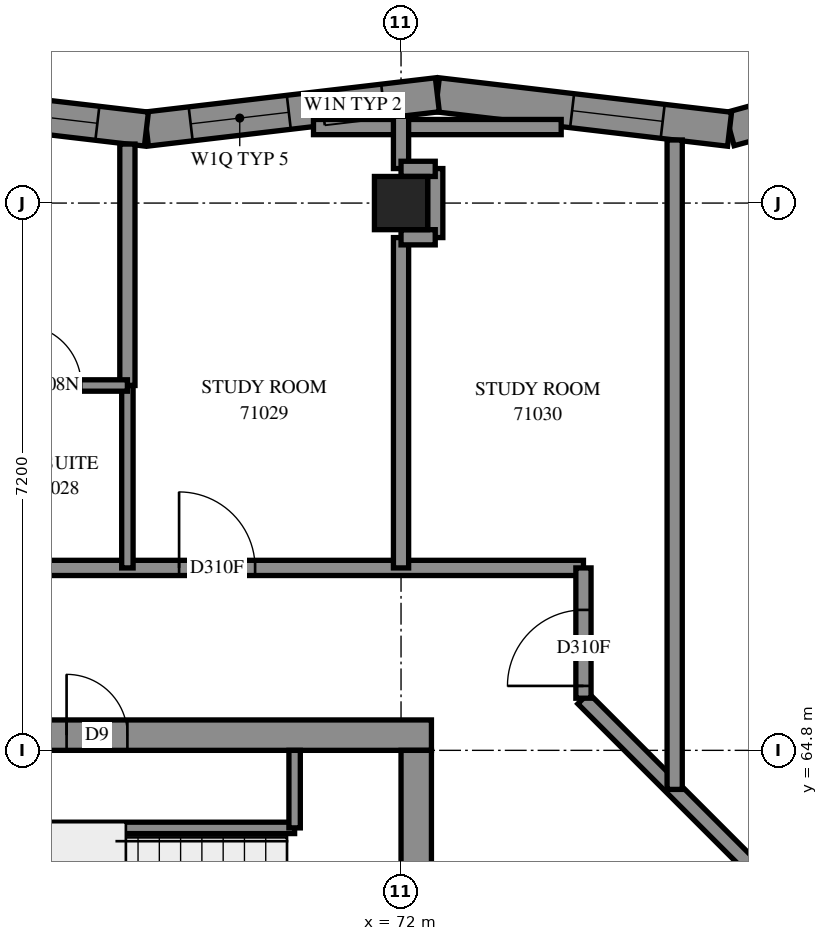
"""IFC4 building model, lengths in metres.
Left out: names, types, materials, properties, quantities, classifications, styles, units other than length and angle.
Written with IfcOpenShell. Run it as: python <this file> out.ifc"""

import sys

from ifc_helpers import new_model, si_unit, direction, frame, frame_2d, origin, origin_2d, place, context, subcontext, project, spatial, polyline, rectangle, outline, extrude, element, fill, save


model = new_model("IFC4")
c1 = context("Model", 3, precision=1e-05, world=origin(), true_north=direction((0.0, 1.0)))
c2 = subcontext(c1, "Body", "Model", "MODEL_VIEW")
j1 = project(units=[si_unit("LENGTHUNIT", "METRE"), si_unit("PLANEANGLEUNIT", "RADIAN")], contexts=[c1])
p1 = place(None, origin())
s1 = spatial("IfcSite", under=j1, at=p1, CompositionType="ELEMENT")
p2 = place(p1, origin())
s2 = spatial("IfcBuilding", under=s1, at=p2, CompositionType="ELEMENT")
p3 = place(p2, frame((0.0, 0.0, 260.8)))
s3 = spatial("IfcBuildingStorey", under=s2, at=p3, CompositionType="ELEMENT", Elevation=260.8)
p4 = place(p3, frame((72.0, 72.0, 0.0), z_axis=(0.0, 0.0, 1.0), x_axis=(1.0, 0.0, 0.0)))
e1 = element("IfcColumn", 1, at=p4, inside=s3, PredefinedType="COLUMN", context=c2, shape_type="SweptSolid", body=[
    extrude(rectangle(XDim=0.7, YDim=0.7, at=origin_2d()), origin(), (0.0, 0.0, 1.0), 3.1),
])
p5 = place(p3, frame((57.2, 65.0, -0.3), z_axis=(0.0, 0.0, 1.0), x_axis=(1.0, 0.0, 0.0)))
e2 = element("IfcWall", 2, at=p5, inside=s3, PredefinedType="SHEAR", context=c2, shape_type="SweptSolid", body=[
    extrude(rectangle(XDim=15.2, YDim=0.4, at=frame_2d((7.6, 0.0))), origin(), (0.0, 0.0, 1.0), 2.7),
])
p6 = place(p5, frame((10.4, 0.0, 0.3)))
e3 = element("IfcOpeningElement", 3, at=p6, cuts=e2, PredefinedType="OPENING", context=c2, shape_type="SweptSolid", body=[
    extrude(rectangle(XDim=0.8, YDim=2.1, at=frame_2d((0.4, 1.05))), frame((0.0, 0.21, 0.0), z_axis=(0.0, -1.0, 0.0), x_axis=(1.0, 0.0, 0.0)), (0.0, 0.0, 1.0), 0.42),
])
p7 = place(p3, frame((72.2, 50.4, -0.3), z_axis=(0.0, 0.0, 1.0), x_axis=(0.0, 1.0, 0.0)))
e4 = element("IfcWall", 4, at=p7, inside=s3, PredefinedType="SHEAR", context=c2, shape_type="SweptSolid", body=[
    extrude(rectangle(XDim=14.4, YDim=0.4, at=frame_2d((7.2, 0.0))), origin(), (0.0, 0.0, 1.0), 2.7),
])
p8 = place(p7, frame((4.55, 0.0, 0.3)))
e5 = element("IfcOpeningElement", 5, at=p8, cuts=e4, PredefinedType="OPENING", context=c2, shape_type="SweptSolid", body=[
    extrude(rectangle(XDim=1.1, YDim=2.1, at=frame_2d((0.55, 1.05))), frame((0.0, 0.21, 0.0), z_axis=(0.0, -1.0, 0.0), x_axis=(1.0, 0.0, 0.0)), (0.0, 0.0, 1.0), 0.42),
])
p9 = place(p7, frame((11.35, 0.0, 0.3)))
e6 = element("IfcOpeningElement", 6, at=p9, cuts=e4, PredefinedType="OPENING", context=c2, shape_type="SweptSolid", body=[
    extrude(rectangle(XDim=1.1, YDim=2.1, at=frame_2d((0.55, 1.05))), frame((0.0, 0.21, 0.0), z_axis=(0.0, -1.0, 0.0), x_axis=(1.0, 0.0, 0.0)), (0.0, 0.0, 1.0), 0.42),
])
p10 = place(p3, frame((80.017, 73.986, 0.0), z_axis=(0.0, 0.0, 1.0), x_axis=(-0.9643045882, -0.2647955081, 0.0)))
e7 = element("IfcWall", 7, at=p10, inside=s3, PredefinedType="SOLIDWALL", context=c2, shape_type="SweptSolid", body=[
    extrude(outline(polyline([(-0.182, -0.225), (3.787, -0.225), (3.875, 0.225), (0.182, 0.225), (-0.182, -0.225)])), origin(), (0.0, 0.0, 1.0), 3.1),
])
p11 = place(p10, frame((1.239, 0.0, 0.45)))
e8 = element("IfcOpeningElement", 8, at=p11, cuts=e7, PredefinedType="OPENING", context=c2, shape_type="SweptSolid", body=[
    extrude(rectangle(XDim=1.2, YDim=2.55, at=frame_2d((0.6, 1.275))), frame((0.0, 0.235, 0.0), z_axis=(0.0, -1.0, 0.0), x_axis=(1.0, 0.0, 0.0)), (0.0, 0.0, 1.0), 0.47),
])
p12 = place(p3, frame((76.322, 72.971, 0.0), z_axis=(0.0, 0.0, 1.0), x_axis=(-0.9931297821, 0.117018101, 0.0)))
e9 = element("IfcWall", 9, at=p12, inside=s3, PredefinedType="SOLIDWALL", context=c2, shape_type="SweptSolid", body=[
    extrude(outline(polyline([(0.044, -0.225), (3.898, -0.225), (3.845, 0.225), (-0.044, 0.225), (0.044, -0.225)])), origin(), (0.0, 0.0, 1.0), 3.1),
])
p13 = place(p12, frame((0.886, 0.0, 0.45)))
e10 = element("IfcOpeningElement", 10, at=p13, cuts=e9, PredefinedType="OPENING", context=c2, shape_type="SweptSolid", body=[
    extrude(rectangle(XDim=1.2, YDim=2.55, at=frame_2d((0.6, 1.275))), frame((0.0, 0.235, 0.0), z_axis=(0.0, -1.0, 0.0), x_axis=(1.0, 0.0, 0.0)), (0.0, 0.0, 1.0), 0.47),
])
p14 = place(p3, frame((72.478, 73.424, 0.0), z_axis=(0.0, 0.0, 1.0), x_axis=(-0.9931289789, -0.1170249176, 0.0)))
e11 = element("IfcWall", 11, at=p14, inside=s3, PredefinedType="SOLIDWALL", context=c2, shape_type="SweptSolid", body=[
    extrude(outline(polyline([(-0.026, -0.225), (3.827, -0.225), (3.88, 0.225), (0.026, 0.225), (-0.026, -0.225)])), origin(), (0.0, 0.0, 1.0), 3.1),
])
p15 = place(p14, frame((0.718, 0.0, 0.45)))
e12 = element("IfcOpeningElement", 12, at=p15, cuts=e11, PredefinedType="OPENING", context=c2, shape_type="SweptSolid", body=[
    extrude(rectangle(XDim=0.8, YDim=2.5, at=frame_2d((0.4, 1.25))), frame((0.0, 0.235, 0.0), z_axis=(0.0, -1.0, 0.0), x_axis=(1.0, 0.0, 0.0)), (0.0, 0.0, 1.0), 0.47),
])
p16 = place(p14, frame((1.968, 0.0, 0.45)))
e13 = element("IfcOpeningElement", 13, at=p16, cuts=e11, PredefinedType="OPENING", context=c2, shape_type="SweptSolid", body=[
    extrude(rectangle(XDim=1.3, YDim=2.5, at=frame_2d((0.65, 1.25))), frame((0.0, 0.235, 0.0), z_axis=(0.0, -1.0, 0.0), x_axis=(1.0, 0.0, 0.0)), (0.0, 0.0, 1.0), 0.47),
])
p17 = place(p3, frame((68.65, 72.973, 0.0), z_axis=(0.0, 0.0, 1.0), x_axis=(-0.9931289789, 0.1170249176, 0.0)))
e14 = element("IfcWall", 14, at=p17, inside=s3, PredefinedType="SOLIDWALL", context=c2, shape_type="SweptSolid", body=[
    extrude(outline(polyline([(0.026, -0.225), (3.88, -0.225), (3.827, 0.225), (-0.026, 0.225), (0.026, -0.225)])), origin(), (0.0, 0.0, 1.0), 3.1),
])
p18 = place(p17, frame((0.65, 0.0, 0.45)))
e15 = element("IfcOpeningElement", 15, at=p18, cuts=e14, PredefinedType="OPENING", context=c2, shape_type="SweptSolid", body=[
    extrude(rectangle(XDim=1.3, YDim=2.5, at=frame_2d((0.65, 1.25))), frame((0.0, 0.235, 0.0), z_axis=(0.0, -1.0, 0.0), x_axis=(1.0, 0.0, 0.0)), (0.0, 0.0, 1.0), 0.47),
])
p19 = place(p17, frame((2.3, 0.0, 0.45)))
e16 = element("IfcOpeningElement", 16, at=p19, cuts=e14, PredefinedType="OPENING", context=c2, shape_type="SweptSolid", body=[
    extrude(rectangle(XDim=1.0, YDim=2.5, at=frame_2d((0.5, 1.25))), frame((0.0, 0.235, 0.0), z_axis=(0.0, -1.0, 0.0), x_axis=(1.0, 0.0, 0.0)), (0.0, 0.0, 1.0), 0.47),
])
p20 = place(p3, frame((64.95, 63.78, 0.0), z_axis=(0.0, 0.0, 1.0), x_axis=(1.0, 0.0, 0.0)))
e17 = element("IfcWall", 17, at=p20, inside=s3, PredefinedType="PARTITIONING", context=c2, shape_type="SweptSolid", body=[
    extrude(rectangle(XDim=5.65, YDim=0.15, at=frame_2d((2.825, 0.0))), origin(), (0.0, 0.0, 1.0), 3.1),
])
p21 = place(p3, frame((70.6, 63.78, 0.0), z_axis=(0.0, 0.0, 1.0), x_axis=(0.0, 1.0, 0.0)))
e18 = element("IfcWall", 18, at=p21, inside=s3, PredefinedType="PARTITIONING", context=c2, shape_type="SweptSolid", body=[
    extrude(rectangle(XDim=1.02, YDim=0.15, at=frame_2d((0.51, 0.0))), origin(), (0.0, 0.0, 1.0), 3.1),
])
p22 = place(p3, frame((55.2, 67.2, 0.0), z_axis=(0.0, 0.0, 1.0), x_axis=(1.0, 0.0, 0.0)))
e19 = element("IfcWall", 19, at=p22, inside=s3, PredefinedType="PARTITIONING", context=c2, shape_type="SweptSolid", body=[
    extrude(rectangle(XDim=19.2, YDim=0.2, at=frame_2d((9.6, 0.0))), origin(), (0.0, 0.0, 1.0), 3.1),
])
p23 = place(p22, frame((4.475, 0.0, 0.0)))
e20 = element("IfcOpeningElement", 20, at=p23, cuts=e19, PredefinedType="OPENING", context=c2, shape_type="SweptSolid", body=[
    extrude(rectangle(XDim=1.0, YDim=2.1, at=frame_2d((0.5, 1.05))), frame((0.0, 0.11, 0.0), z_axis=(0.0, -1.0, 0.0), x_axis=(1.0, 0.0, 0.0)), (0.0, 0.0, 1.0), 0.22),
])
p24 = place(p22, frame((8.301, 0.0, 0.0)))
e21 = element("IfcOpeningElement", 21, at=p24, cuts=e19, PredefinedType="OPENING", context=c2, shape_type="SweptSolid", body=[
    extrude(rectangle(XDim=0.9, YDim=2.1, at=frame_2d((0.45, 1.05))), frame((0.0, 0.11, 0.0), z_axis=(0.0, -1.0, 0.0), x_axis=(1.0, 0.0, 0.0)), (0.0, 0.0, 1.0), 0.22),
])
p25 = place(p22, frame((13.88, 0.0, 0.0)))
e22 = element("IfcOpeningElement", 22, at=p25, cuts=e19, PredefinedType="OPENING", context=c2, shape_type="SweptSolid", body=[
    extrude(rectangle(XDim=1.0, YDim=2.1, at=frame_2d((0.5, 1.05))), frame((0.0, 0.11, 0.0), z_axis=(0.0, -1.0, 0.0), x_axis=(1.0, 0.0, 0.0)), (0.0, 0.0, 1.0), 0.22),
])
p26 = place(p3, frame((74.397, 65.483, 0.0), z_axis=(0.0, 0.0, 1.0), x_axis=(0.7071067812, -0.7071067812, 0.0)))
e23 = element("IfcWall", 23, at=p26, inside=s3, PredefinedType="PARTITIONING", context=c2, shape_type="SweptSolid", body=[
    extrude(rectangle(XDim=10.788, YDim=0.2, at=frame_2d((5.394, 0.0))), origin(), (0.0, 0.0, 1.0), 3.1),
])
p27 = place(p26, frame((5.083, 0.0, 0.0)))
e24 = element("IfcOpeningElement", 24, at=p27, cuts=e23, PredefinedType="OPENING", context=c2, shape_type="SweptSolid", body=[
    extrude(rectangle(XDim=1.0, YDim=2.1, at=frame_2d((0.5, 1.05))), frame((0.0, 0.11, 0.0), z_axis=(0.0, -1.0, 0.0), x_axis=(1.0, 0.0, 0.0)), (0.0, 0.0, 1.0), 0.22),
])
p28 = place(p26, frame((7.858, 0.0, 0.0)))
e25 = element("IfcOpeningElement", 25, at=p28, cuts=e23, PredefinedType="OPENING", context=c2, shape_type="SweptSolid", body=[
    extrude(rectangle(XDim=1.0, YDim=2.1, at=frame_2d((0.5, 1.05))), frame((0.0, 0.11, 0.0), z_axis=(0.0, -1.0, 0.0), x_axis=(1.0, 0.0, 0.0)), (0.0, 0.0, 1.0), 0.22),
])
p29 = place(p3, frame((75.6, 64.286, 0.0), z_axis=(0.0, 0.0, 1.0), x_axis=(0.0, 1.0, 0.0)))
e26 = element("IfcWall", 26, at=p29, inside=s3, PredefinedType="PARTITIONING", context=c2, shape_type="SweptSolid", body=[
    extrude(rectangle(XDim=8.544, YDim=0.2, at=frame_2d((4.272, 0.0))), origin(), (0.0, 0.0, 1.0), 3.1),
])
p30 = place(p3, frame((72.0, 67.2, 0.0), z_axis=(0.0, 0.0, 1.0), x_axis=(0.0, 1.0, 0.0)))
e27 = element("IfcWall", 27, at=p30, inside=s3, PredefinedType="PARTITIONING", context=c2, shape_type="SweptSolid", body=[
    extrude(rectangle(XDim=4.346, YDim=0.2, at=frame_2d((2.173, 0.0))), origin(), (0.0, 0.0, 1.0), 3.1),
])
p31 = place(p3, frame((70.848, 73.0, 0.0), z_axis=(0.0, 0.0, 1.0), x_axis=(1.0, 0.0, 0.0)))
e28 = element("IfcWall", 28, at=p31, inside=s3, PredefinedType="PARTITIONING", context=c2, shape_type="SweptSolid", body=[
    extrude(rectangle(XDim=3.259, YDim=0.2, at=frame_2d((1.629, 0.0))), origin(), (0.0, 0.0, 1.0), 3.1),
])
p32 = place(p3, frame((68.4, 69.6, 0.0), z_axis=(0.0, 0.0, 1.0), x_axis=(0.0, 1.0, 0.0)))
e29 = element("IfcWall", 29, at=p32, inside=s3, PredefinedType="PARTITIONING", context=c2, shape_type="SweptSolid", body=[
    extrude(rectangle(XDim=3.176, YDim=0.2, at=frame_2d((1.588, 0.0))), origin(), (0.0, 0.0, 1.0), 3.1),
])
p33 = place(p3, frame((68.4, 67.2, 0.0), z_axis=(0.0, 0.0, 1.0), x_axis=(0.0, 1.0, 0.0)))
e30 = element("IfcWall", 30, at=p33, inside=s3, PredefinedType="PARTITIONING", context=c2, shape_type="SweptSolid", body=[
    extrude(rectangle(XDim=2.4, YDim=0.15, at=frame_2d((1.2, 0.0))), origin(), (0.0, 0.0, 1.0), 3.1),
])
p34 = place(p3, frame((66.5, 69.6, 0.0), z_axis=(0.0, 0.0, 1.0), x_axis=(1.0, 0.0, 0.0)))
e31 = element("IfcWall", 31, at=p34, inside=s3, PredefinedType="PARTITIONING", context=c2, shape_type="SweptSolid", body=[
    extrude(rectangle(XDim=1.9, YDim=0.15, at=frame_2d((0.95, 0.0))), origin(), (0.0, 0.0, 1.0), 3.1),
])
p35 = place(p34, frame((0.493, 0.0, 0.0)))
e32 = element("IfcOpeningElement", 32, at=p35, cuts=e31, PredefinedType="OPENING", context=c2, shape_type="SweptSolid", body=[
    extrude(rectangle(XDim=0.8, YDim=2.1, at=frame_2d((0.4, 1.05))), frame((0.0, 0.085, 0.0), z_axis=(0.0, -1.0, 0.0), x_axis=(1.0, 0.0, 0.0)), (0.0, 0.0, 1.0), 0.17),
])
p36 = place(p3, frame((74.4, 65.486, 0.0), z_axis=(0.0, 0.0, 1.0), x_axis=(0.0, 1.0, 0.0)))
e33 = element("IfcWall", 33, at=p36, inside=s3, PredefinedType="PARTITIONING", context=c2, shape_type="SweptSolid", body=[
    extrude(rectangle(XDim=1.714, YDim=0.2, at=frame_2d((0.857, 0.0))), origin(), (0.0, 0.0, 1.0), 3.1),
])
p37 = place(p36, frame((0.162, 0.0, 0.0)))
e34 = element("IfcOpeningElement", 34, at=p37, cuts=e33, PredefinedType="OPENING", context=c2, shape_type="SweptSolid", body=[
    extrude(rectangle(XDim=1.0, YDim=2.1, at=frame_2d((0.5, 1.05))), frame((0.0, 0.11, 0.0), z_axis=(0.0, -1.0, 0.0), x_axis=(1.0, 0.0, 0.0)), (0.0, 0.0, 1.0), 0.22),
])
p38 = place(p3, frame((72.45, 71.546, 0.0), z_axis=(0.0, 0.0, 1.0), x_axis=(0.0, 1.0, 0.0)))
e35 = element("IfcWall", 35, at=p38, inside=s3, PredefinedType="PARTITIONING", context=c2, shape_type="SweptSolid", body=[
    extrude(rectangle(XDim=0.908, YDim=0.2, at=frame_2d((0.454, 0.0))), origin(), (0.0, 0.0, 1.0), 3.1),
])
p39 = place(p3, frame((72.0, 72.454, 0.0), z_axis=(0.0, 0.0, 1.0), x_axis=(0.0, 1.0, 0.0)))
e36 = element("IfcWall", 36, at=p39, inside=s3, PredefinedType="PARTITIONING", context=c2, shape_type="SweptSolid", body=[
    extrude(rectangle(XDim=0.688, YDim=0.2, at=frame_2d((0.344, 0.0))), origin(), (0.0, 0.0, 1.0), 3.1),
])
for number, where, z_axis, x_axis in (
    (37, (72.0, 72.45, 0.0), (0.0, 0.0, 1.0), (1.0, 0.0, 0.0)),
    (38, (72.0, 71.55, 0.0), (0.0, 0.0, 1.0), (1.0, 0.0, 0.0)),
):
    element("IfcWall", number, at=place(p3, frame(where, z_axis=z_axis, x_axis=x_axis)), inside=s3, PredefinedType="PARTITIONING", context=c2, shape_type="SweptSolid", body=[
        extrude(rectangle(XDim=0.45, YDim=0.2, at=frame_2d((0.225, 0.0))), origin(), (0.0, 0.0, 1.0), 3.1),
    ])
p40 = place(p13, origin())
e39 = element("IfcWindow", 39, at=p40, inside=s3, PartitioningType="SINGLE_PANEL", PredefinedType="WINDOW", context=c2, shape_type="SweptSolid", body=[
    extrude(rectangle(XDim=1.2, YDim=2.55, at=frame_2d((0.6, 1.275))), frame((0.0, 0.205, 0.0), z_axis=(0.0, -1.0, 0.0), x_axis=(1.0, 0.0, 0.0)), (0.0, 0.0, 1.0), 0.06),
])
fill(e10, e39)
p41 = place(p6, origin())
e40 = element("IfcDoor", 40, at=p41, inside=s3, OperationType="SINGLE_SWING_RIGHT", PredefinedType="DOOR", context=c2, shape_type="SweptSolid", body=[
    extrude(rectangle(XDim=0.8, YDim=2.1, at=frame_2d((0.4, 1.05))), frame((0.0, 0.025, 0.0), z_axis=(0.0, -1.0, 0.0), x_axis=(1.0, 0.0, 0.0)), (0.0, 0.0, 1.0), 0.05),
])
fill(e3, e40)
p42 = place(p35, origin())
e41 = element("IfcDoor", 41, at=p42, inside=s3, OperationType="SINGLE_SWING_RIGHT", PredefinedType="DOOR", context=c2, shape_type="SweptSolid", body=[
    extrude(rectangle(XDim=0.8, YDim=2.1, at=frame_2d((0.4, 1.05))), frame((0.0, 0.025, 0.0), z_axis=(0.0, -1.0, 0.0), x_axis=(1.0, 0.0, 0.0)), (0.0, 0.0, 1.0), 0.05),
])
fill(e32, e41)
p43 = place(p25, origin())
e42 = element("IfcDoor", 42, at=p43, inside=s3, OperationType="SINGLE_SWING_LEFT", PredefinedType="DOOR", context=c2, shape_type="SweptSolid", body=[
    extrude(rectangle(XDim=1.0, YDim=2.1, at=frame_2d((0.5, 1.05))), frame((0.0, 0.025, 0.0), z_axis=(0.0, -1.0, 0.0), x_axis=(1.0, 0.0, 0.0)), (0.0, 0.0, 1.0), 0.05),
])
fill(e22, e42)
p44 = place(p37, origin())
e43 = element("IfcDoor", 43, at=p44, inside=s3, OperationType="SINGLE_SWING_RIGHT", PredefinedType="DOOR", context=c2, shape_type="SweptSolid", body=[
    extrude(rectangle(XDim=1.0, YDim=2.1, at=frame_2d((0.5, 1.05))), frame((0.0, 0.025, 0.0), z_axis=(0.0, -1.0, 0.0), x_axis=(1.0, 0.0, 0.0)), (0.0, 0.0, 1.0), 0.05),
])
fill(e34, e43)
p45 = place(p15, origin())
e44 = element("IfcWindow", 44, at=p45, inside=s3, PartitioningType="SINGLE_PANEL", PredefinedType="WINDOW", context=c2, shape_type="SweptSolid", body=[
    extrude(rectangle(XDim=0.8, YDim=2.5, at=frame_2d((0.4, 1.25))), frame((0.0, 0.115, 0.0), z_axis=(0.0, -1.0, 0.0), x_axis=(1.0, 0.0, 0.0)), (0.0, 0.0, 1.0), 0.06),
])
fill(e12, e44)
p46 = place(p16, origin())
e45 = element("IfcWindow", 45, at=p46, inside=s3, PartitioningType="SINGLE_PANEL", PredefinedType="WINDOW", context=c2, shape_type="SweptSolid", body=[
    extrude(rectangle(XDim=1.3, YDim=2.5, at=frame_2d((0.65, 1.25))), frame((0.0, 0.205, 0.0), z_axis=(0.0, -1.0, 0.0), x_axis=(1.0, 0.0, 0.0)), (0.0, 0.0, 1.0), 0.06),
])
fill(e13, e45)
p47 = place(p18, origin())
e46 = element("IfcWindow", 46, at=p47, inside=s3, PartitioningType="SINGLE_PANEL", PredefinedType="WINDOW", context=c2, shape_type="SweptSolid", body=[
    extrude(rectangle(XDim=1.3, YDim=2.5, at=frame_2d((0.65, 1.25))), frame((0.0, 0.205, 0.0), z_axis=(0.0, -1.0, 0.0), x_axis=(1.0, 0.0, 0.0)), (0.0, 0.0, 1.0), 0.06),
])
fill(e15, e46)
save(model, sys.argv[1])
